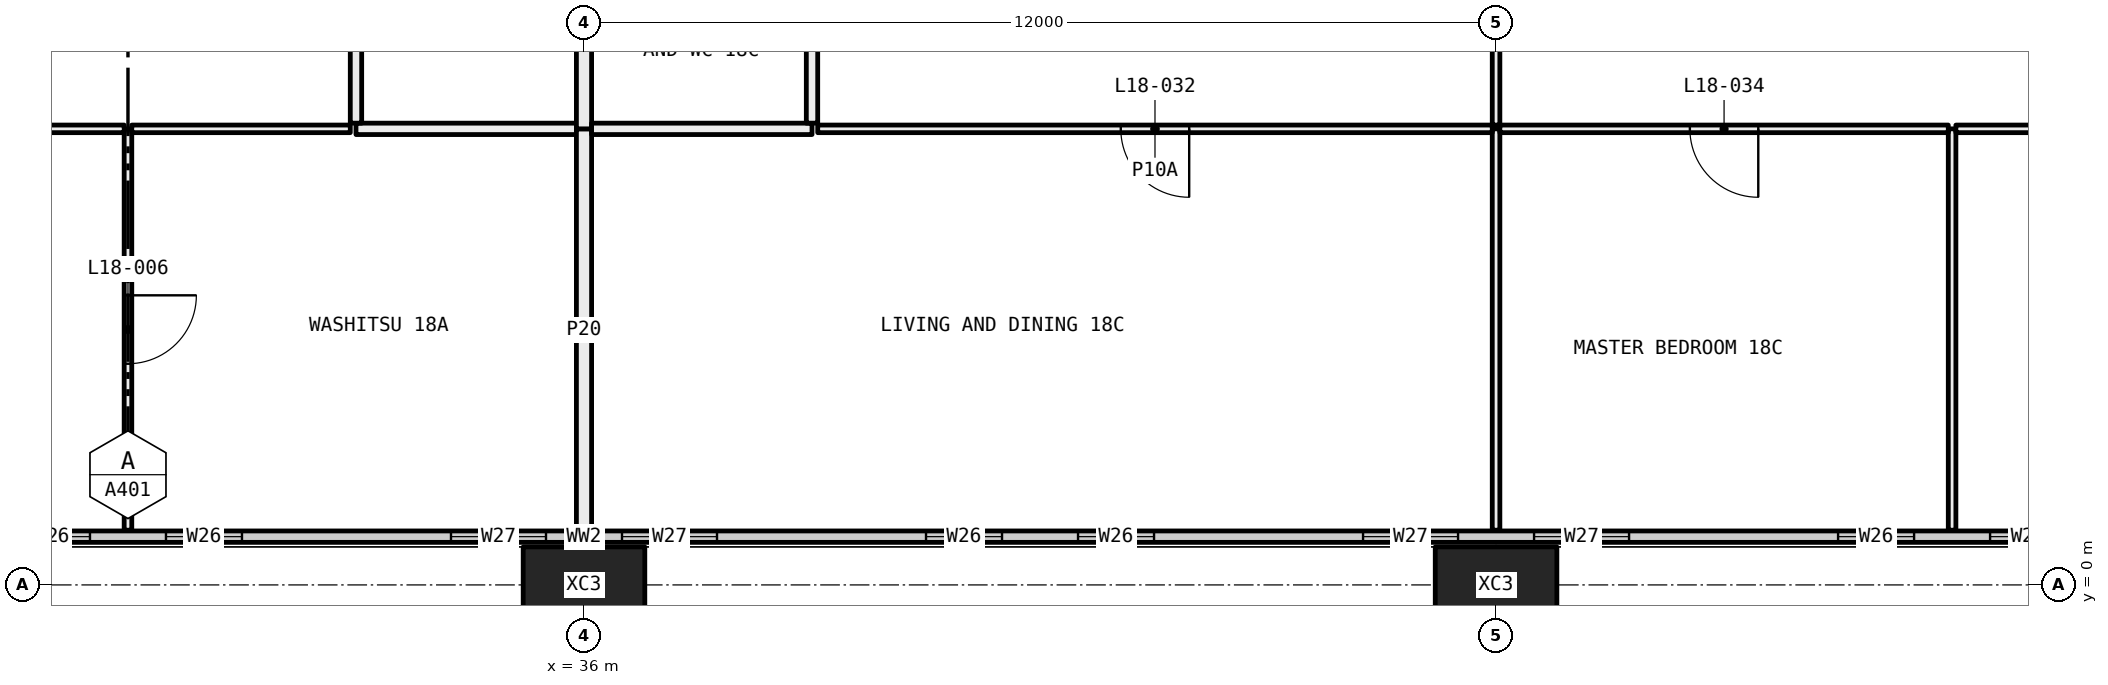
"""IFC4 building model, lengths in metres.
Left out: names, types, materials, properties, quantities, classifications, styles, units other than length and angle.
Written with IfcOpenShell. Run it as: python <this file> out.ifc"""

import sys

from ifc_helpers import new_model, si_unit, direction, frame, frame_2d, origin, origin_2d, place, context, subcontext, project, spatial, rectangle, hollow_rectangle, extrude, element, fill, save


model = new_model("IFC4")
c1 = context("Model", 3, precision=1e-05, world=origin(), true_north=direction((0.0, 1.0)))
c2 = subcontext(c1, "Body", "Model", "MODEL_VIEW")
j1 = project(units=[si_unit("LENGTHUNIT", "METRE"), si_unit("PLANEANGLEUNIT", "RADIAN")], contexts=[c1])
p1 = place(None, origin())
s1 = spatial("IfcSite", under=j1, at=p1, CompositionType="ELEMENT")
p2 = place(p1, origin())
s2 = spatial("IfcBuilding", under=s1, at=p2, CompositionType="ELEMENT")
p3 = place(p2, frame((0.0, 0.0, 74.85)))
s3 = spatial("IfcBuildingStorey", under=s2, at=p3, CompositionType="ELEMENT", Elevation=74.85)
for number, where, z_axis, x_axis in (
    (1, (36.0, 0.0, -0.4), (0.0, 0.0, 1.0), (1.0, 0.0, 0.0)),
    (2, (48.0, 0.0, -0.4), (0.0, 0.0, 1.0), (1.0, 0.0, 0.0)),
):
    element("IfcColumn", number, at=place(p3, frame(where, z_axis=z_axis, x_axis=x_axis)), inside=s3, PredefinedType="COLUMN", context=c2, shape_type="SweptSolid", body=[
        extrude(hollow_rectangle(XDim=1.6, YDim=1.0, WallThickness=0.065, at=origin_2d()), origin(), (0.0, 0.0, 1.0), 3.45),
    ])
p4 = place(p3, frame((6.56, 0.635, 0.0), z_axis=(0.0, 0.0, 1.0), x_axis=(1.0, 0.0, 0.0)))
e3 = element("IfcWall", 3, at=p4, inside=s3, PredefinedType="ELEMENTEDWALL", context=c2, shape_type="SweptSolid", body=[
    extrude(rectangle(XDim=58.88, YDim=0.15, at=frame_2d((29.44, 0.0))), origin(), (0.0, 0.0, 1.0), 3.05),
])
p5 = place(p4, frame((0.44, 0.0, 0.45)))
e4 = element("IfcOpeningElement", 4, at=p5, cuts=e3, PredefinedType="OPENING", context=c2, shape_type="SweptSolid", body=[
    extrude(rectangle(XDim=4.5, YDim=2.55, at=frame_2d((2.25, 1.275))), frame((0.0, 0.085, 0.0), z_axis=(0.0, -1.0, 0.0), x_axis=(1.0, 0.0, 0.0)), (0.0, 0.0, 1.0), 0.17),
])
p6 = place(p4, frame((5.94, 0.0, 0.45)))
e5 = element("IfcOpeningElement", 5, at=p6, cuts=e3, PredefinedType="OPENING", context=c2, shape_type="SweptSolid", body=[
    extrude(rectangle(XDim=1.25, YDim=2.55, at=frame_2d((0.625, 1.275))), frame((0.0, 0.085, 0.0), z_axis=(0.0, -1.0, 0.0), x_axis=(1.0, 0.0, 0.0)), (0.0, 0.0, 1.0), 0.17),
])
p7 = place(p4, frame((9.94, 0.0, 0.45)))
e6 = element("IfcOpeningElement", 6, at=p7, cuts=e3, PredefinedType="OPENING", context=c2, shape_type="SweptSolid", body=[
    extrude(rectangle(XDim=1.0, YDim=2.55, at=frame_2d((0.5, 1.275))), frame((0.0, 0.085, 0.0), z_axis=(0.0, -1.0, 0.0), x_axis=(1.0, 0.0, 0.0)), (0.0, 0.0, 1.0), 0.17),
])
p8 = place(p4, frame((11.94, 0.0, 0.45)))
e7 = element("IfcOpeningElement", 7, at=p8, cuts=e3, PredefinedType="OPENING", context=c2, shape_type="SweptSolid", body=[
    extrude(rectangle(XDim=1.0, YDim=2.55, at=frame_2d((0.5, 1.275))), frame((0.0, 0.085, 0.0), z_axis=(0.0, -1.0, 0.0), x_axis=(1.0, 0.0, 0.0)), (0.0, 0.0, 1.0), 0.17),
])
p9 = place(p4, frame((15.69, 0.0, 0.45)))
e8 = element("IfcOpeningElement", 8, at=p9, cuts=e3, PredefinedType="OPENING", context=c2, shape_type="SweptSolid", body=[
    extrude(rectangle(XDim=1.25, YDim=2.55, at=frame_2d((0.625, 1.275))), frame((0.0, 0.085, 0.0), z_axis=(0.0, -1.0, 0.0), x_axis=(1.0, 0.0, 0.0)), (0.0, 0.0, 1.0), 0.17),
])
p10 = place(p4, frame((17.94, 0.0, 0.45)))
e9 = element("IfcOpeningElement", 9, at=p10, cuts=e3, PredefinedType="OPENING", context=c2, shape_type="SweptSolid", body=[
    extrude(rectangle(XDim=1.25, YDim=2.55, at=frame_2d((0.625, 1.275))), frame((0.0, 0.085, 0.0), z_axis=(0.0, -1.0, 0.0), x_axis=(1.0, 0.0, 0.0)), (0.0, 0.0, 1.0), 0.17),
])
p11 = place(p4, frame((21.94, 0.0, 0.45)))
e10 = element("IfcOpeningElement", 10, at=p11, cuts=e3, PredefinedType="OPENING", context=c2, shape_type="SweptSolid", body=[
    extrude(rectangle(XDim=1.0, YDim=2.55, at=frame_2d((0.5, 1.275))), frame((0.0, 0.085, 0.0), z_axis=(0.0, -1.0, 0.0), x_axis=(1.0, 0.0, 0.0)), (0.0, 0.0, 1.0), 0.17),
])
p12 = place(p4, frame((23.94, 0.0, 0.45)))
e11 = element("IfcOpeningElement", 11, at=p12, cuts=e3, PredefinedType="OPENING", context=c2, shape_type="SweptSolid", body=[
    extrude(rectangle(XDim=1.0, YDim=2.55, at=frame_2d((0.5, 1.275))), frame((0.0, 0.085, 0.0), z_axis=(0.0, -1.0, 0.0), x_axis=(1.0, 0.0, 0.0)), (0.0, 0.0, 1.0), 0.17),
])
p13 = place(p4, frame((27.69, 0.0, 0.45)))
e12 = element("IfcOpeningElement", 12, at=p13, cuts=e3, PredefinedType="OPENING", context=c2, shape_type="SweptSolid", body=[
    extrude(rectangle(XDim=1.25, YDim=2.55, at=frame_2d((0.625, 1.275))), frame((0.0, 0.085, 0.0), z_axis=(0.0, -1.0, 0.0), x_axis=(1.0, 0.0, 0.0)), (0.0, 0.0, 1.0), 0.17),
])
p14 = place(p4, frame((29.94, 0.0, 0.45)))
e13 = element("IfcOpeningElement", 13, at=p14, cuts=e3, PredefinedType="OPENING", context=c2, shape_type="SweptSolid", body=[
    extrude(rectangle(XDim=1.25, YDim=2.55, at=frame_2d((0.625, 1.275))), frame((0.0, 0.085, 0.0), z_axis=(0.0, -1.0, 0.0), x_axis=(1.0, 0.0, 0.0)), (0.0, 0.0, 1.0), 0.17),
])
p15 = place(p4, frame((33.94, 0.0, 0.45)))
e14 = element("IfcOpeningElement", 14, at=p15, cuts=e3, PredefinedType="OPENING", context=c2, shape_type="SweptSolid", body=[
    extrude(rectangle(XDim=1.0, YDim=2.55, at=frame_2d((0.5, 1.275))), frame((0.0, 0.085, 0.0), z_axis=(0.0, -1.0, 0.0), x_axis=(1.0, 0.0, 0.0)), (0.0, 0.0, 1.0), 0.17),
])
p16 = place(p4, frame((35.94, 0.0, 0.45)))
e15 = element("IfcOpeningElement", 15, at=p16, cuts=e3, PredefinedType="OPENING", context=c2, shape_type="SweptSolid", body=[
    extrude(rectangle(XDim=1.0, YDim=2.55, at=frame_2d((0.5, 1.275))), frame((0.0, 0.085, 0.0), z_axis=(0.0, -1.0, 0.0), x_axis=(1.0, 0.0, 0.0)), (0.0, 0.0, 1.0), 0.17),
])
p17 = place(p4, frame((39.69, 0.0, 0.45)))
e16 = element("IfcOpeningElement", 16, at=p17, cuts=e3, PredefinedType="OPENING", context=c2, shape_type="SweptSolid", body=[
    extrude(rectangle(XDim=1.25, YDim=2.55, at=frame_2d((0.625, 1.275))), frame((0.0, 0.085, 0.0), z_axis=(0.0, -1.0, 0.0), x_axis=(1.0, 0.0, 0.0)), (0.0, 0.0, 1.0), 0.17),
])
p18 = place(p4, frame((41.94, 0.0, 0.45)))
e17 = element("IfcOpeningElement", 17, at=p18, cuts=e3, PredefinedType="OPENING", context=c2, shape_type="SweptSolid", body=[
    extrude(rectangle(XDim=1.25, YDim=2.55, at=frame_2d((0.625, 1.275))), frame((0.0, 0.085, 0.0), z_axis=(0.0, -1.0, 0.0), x_axis=(1.0, 0.0, 0.0)), (0.0, 0.0, 1.0), 0.17),
])
p19 = place(p4, frame((45.94, 0.0, 0.45)))
e18 = element("IfcOpeningElement", 18, at=p19, cuts=e3, PredefinedType="OPENING", context=c2, shape_type="SweptSolid", body=[
    extrude(rectangle(XDim=1.0, YDim=2.55, at=frame_2d((0.5, 1.275))), frame((0.0, 0.085, 0.0), z_axis=(0.0, -1.0, 0.0), x_axis=(1.0, 0.0, 0.0)), (0.0, 0.0, 1.0), 0.17),
])
p20 = place(p4, frame((47.94, 0.0, 0.45)))
e19 = element("IfcOpeningElement", 19, at=p20, cuts=e3, PredefinedType="OPENING", context=c2, shape_type="SweptSolid", body=[
    extrude(rectangle(XDim=1.0, YDim=2.55, at=frame_2d((0.5, 1.275))), frame((0.0, 0.085, 0.0), z_axis=(0.0, -1.0, 0.0), x_axis=(1.0, 0.0, 0.0)), (0.0, 0.0, 1.0), 0.17),
])
p21 = place(p4, frame((51.69, 0.0, 0.45)))
e20 = element("IfcOpeningElement", 20, at=p21, cuts=e3, PredefinedType="OPENING", context=c2, shape_type="SweptSolid", body=[
    extrude(rectangle(XDim=1.25, YDim=2.55, at=frame_2d((0.625, 1.275))), frame((0.0, 0.085, 0.0), z_axis=(0.0, -1.0, 0.0), x_axis=(1.0, 0.0, 0.0)), (0.0, 0.0, 1.0), 0.17),
])
p22 = place(p4, frame((53.94, 0.0, 0.45)))
e21 = element("IfcOpeningElement", 21, at=p22, cuts=e3, PredefinedType="OPENING", context=c2, shape_type="SweptSolid", body=[
    extrude(rectangle(XDim=4.5, YDim=2.55, at=frame_2d((2.25, 1.275))), frame((0.0, 0.085, 0.0), z_axis=(0.0, -1.0, 0.0), x_axis=(1.0, 0.0, 0.0)), (0.0, 0.0, 1.0), 0.17),
])
p23 = place(p3, frame((30.0, 0.72, 0.0), z_axis=(0.0, 0.0, 1.0), x_axis=(0.0, 1.0, 0.0)))
e22 = element("IfcWall", 22, at=p23, inside=s3, PredefinedType="PARTITIONING", context=c2, shape_type="SweptSolid", body=[
    extrude(rectangle(XDim=5.28, YDim=0.1, at=frame_2d((2.64, 0.0))), origin(), (0.0, 0.0, 1.0), 3.05),
])
p24 = place(p23, frame((2.19, 0.0, 0.0)))
e23 = element("IfcOpeningElement", 23, at=p24, cuts=e22, PredefinedType="OPENING", context=c2, shape_type="SweptSolid", body=[
    extrude(rectangle(XDim=0.9, YDim=2.1, at=frame_2d((0.45, 1.05))), frame((0.0, 0.06, 0.0), z_axis=(0.0, -1.0, 0.0), x_axis=(1.0, 0.0, 0.0)), (0.0, 0.0, 1.0), 0.12),
])
p25 = place(p3, frame((29.95, 6.0, 0.0), z_axis=(0.0, 0.0, 1.0), x_axis=(-1.0, 0.0, 0.0)))
e24 = element("IfcWall", 24, at=p25, inside=s3, PredefinedType="PARTITIONING", context=c2, shape_type="SweptSolid", body=[
    extrude(rectangle(XDim=6.05, YDim=0.1, at=frame_2d((3.025, 0.0))), origin(), (0.0, 0.0, 1.0), 2.45),
])
p26 = place(p25, frame((2.575, 0.0, 0.0)))
e25 = element("IfcOpeningElement", 25, at=p26, cuts=e24, PredefinedType="OPENING", context=c2, shape_type="SweptSolid", body=[
    extrude(rectangle(XDim=0.9, YDim=2.1, at=frame_2d((0.45, 1.05))), frame((0.0, 0.06, 0.0), z_axis=(0.0, -1.0, 0.0), x_axis=(1.0, 0.0, 0.0)), (0.0, 0.0, 1.0), 0.12),
])
p27 = place(p3, frame((32.925, 6.0, 0.0), z_axis=(0.0, 0.0, 1.0), x_axis=(-1.0, 0.0, 0.0)))
e26 = element("IfcWall", 26, at=p27, inside=s3, PredefinedType="PARTITIONING", context=c2, shape_type="SweptSolid", body=[
    extrude(rectangle(XDim=2.875, YDim=0.1, at=frame_2d((1.438, 0.0))), origin(), (0.0, 0.0, 1.0), 3.05),
])
p28 = place(p3, frame((35.9, 6.0, 0.0), z_axis=(0.0, 0.0, 1.0), x_axis=(-1.0, 0.0, 0.0)))
e27 = element("IfcWall", 27, at=p28, inside=s3, PredefinedType="PARTITIONING", context=c2, shape_type="SweptSolid", body=[
    extrude(rectangle(XDim=2.9, YDim=0.15, at=frame_2d((1.45, 0.0))), origin(), (0.0, 0.0, 1.0), 3.05),
])
p29 = place(p3, frame((36.0, 0.72, 0.0), z_axis=(0.0, 0.0, 1.0), x_axis=(0.0, 1.0, 0.0)))
e28 = element("IfcWall", 28, at=p29, inside=s3, PredefinedType="PARTITIONING", context=c2, shape_type="SweptSolid", body=[
    extrude(rectangle(XDim=5.28, YDim=0.2, at=frame_2d((2.64, 0.0))), origin(), (0.0, 0.0, 1.0), 2.45),
])
p30 = place(p3, frame((33.0, 6.075, 0.0), z_axis=(0.0, 0.0, 1.0), x_axis=(0.0, 1.0, 0.0)))
e29 = element("IfcWall", 29, at=p30, inside=s3, PredefinedType="PARTITIONING", context=c2, shape_type="SweptSolid", body=[
    extrude(rectangle(XDim=5.925, YDim=0.15, at=frame_2d((2.962, 0.0))), origin(), (0.0, 0.0, 1.0), 2.45),
])
p31 = place(p30, frame((2.512, 0.0, 0.0)))
e30 = element("IfcOpeningElement", 30, at=p31, cuts=e29, PredefinedType="OPENING", context=c2, shape_type="SweptSolid", body=[
    extrude(rectangle(XDim=0.9, YDim=2.1, at=frame_2d((0.45, 1.05))), frame((0.0, 0.085, 0.0), z_axis=(0.0, -1.0, 0.0), x_axis=(1.0, 0.0, 0.0)), (0.0, 0.0, 1.0), 0.17),
])
p32 = place(p3, frame((36.0, 6.0, 0.0), z_axis=(0.0, 0.0, 1.0), x_axis=(0.0, 1.0, 0.0)))
e31 = element("IfcWall", 31, at=p32, inside=s3, PredefinedType="PARTITIONING", context=c2, shape_type="SweptSolid", body=[
    extrude(rectangle(XDim=5.2, YDim=0.2, at=frame_2d((2.6, 0.0))), origin(), (0.0, 0.0, 1.0), 2.45),
])
p33 = place(p3, frame((48.0, 0.72, 0.0), z_axis=(0.0, 0.0, 1.0), x_axis=(0.0, 1.0, 0.0)))
e32 = element("IfcWall", 32, at=p33, inside=s3, PredefinedType="PARTITIONING", context=c2, shape_type="SweptSolid", body=[
    extrude(rectangle(XDim=5.28, YDim=0.1, at=frame_2d((2.64, 0.0))), origin(), (0.0, 0.0, 1.0), 2.45),
])
p34 = place(p3, frame((39.0, 6.0, 0.0), z_axis=(0.0, 0.0, 1.0), x_axis=(-1.0, 0.0, 0.0)))
e33 = element("IfcWall", 33, at=p34, inside=s3, PredefinedType="PARTITIONING", context=c2, shape_type="SweptSolid", body=[
    extrude(rectangle(XDim=2.9, YDim=0.15, at=frame_2d((1.45, 0.0))), origin(), (0.0, 0.0, 1.0), 3.05),
])
p35 = place(p3, frame((47.95, 6.0, 0.0), z_axis=(0.0, 0.0, 1.0), x_axis=(-1.0, 0.0, 0.0)))
e34 = element("IfcWall", 34, at=p35, inside=s3, PredefinedType="PARTITIONING", context=c2, shape_type="SweptSolid", body=[
    extrude(rectangle(XDim=8.875, YDim=0.1, at=frame_2d((4.438, 0.0))), origin(), (0.0, 0.0, 1.0), 2.45),
])
p36 = place(p35, frame((3.988, 0.0, 0.0)))
e35 = element("IfcOpeningElement", 35, at=p36, cuts=e34, PredefinedType="OPENING", context=c2, shape_type="SweptSolid", body=[
    extrude(rectangle(XDim=0.9, YDim=2.1, at=frame_2d((0.45, 1.05))), frame((0.0, 0.06, 0.0), z_axis=(0.0, -1.0, 0.0), x_axis=(1.0, 0.0, 0.0)), (0.0, 0.0, 1.0), 0.12),
])
p37 = place(p3, frame((54.0, 0.72, 0.0), z_axis=(0.0, 0.0, 1.0), x_axis=(0.0, 1.0, 0.0)))
e36 = element("IfcWall", 36, at=p37, inside=s3, PredefinedType="PARTITIONING", context=c2, shape_type="SweptSolid", body=[
    extrude(rectangle(XDim=5.28, YDim=0.1, at=frame_2d((2.64, 0.0))), origin(), (0.0, 0.0, 1.0), 3.05),
])
p38 = place(p3, frame((53.95, 6.0, 0.0), z_axis=(0.0, 0.0, 1.0), x_axis=(-1.0, 0.0, 0.0)))
e37 = element("IfcWall", 37, at=p38, inside=s3, PredefinedType="PARTITIONING", context=c2, shape_type="SweptSolid", body=[
    extrude(rectangle(XDim=5.9, YDim=0.1, at=frame_2d((2.95, 0.0))), origin(), (0.0, 0.0, 1.0), 2.45),
])
p39 = place(p38, frame((2.5, 0.0, 0.0)))
e38 = element("IfcOpeningElement", 38, at=p39, cuts=e37, PredefinedType="OPENING", context=c2, shape_type="SweptSolid", body=[
    extrude(rectangle(XDim=0.9, YDim=2.1, at=frame_2d((0.45, 1.05))), frame((0.0, 0.06, 0.0), z_axis=(0.0, -1.0, 0.0), x_axis=(1.0, 0.0, 0.0)), (0.0, 0.0, 1.0), 0.12),
])
p40 = place(p3, frame((57.0, 6.0, 0.0), z_axis=(0.0, 0.0, 1.0), x_axis=(-1.0, 0.0, 0.0)))
e39 = element("IfcWall", 39, at=p40, inside=s3, PredefinedType="PARTITIONING", context=c2, shape_type="SweptSolid", body=[
    extrude(rectangle(XDim=2.95, YDim=0.1, at=frame_2d((1.475, 0.0))), origin(), (0.0, 0.0, 1.0), 3.05),
])
p41 = place(p40, frame((1.025, 0.0, 0.0)))
e40 = element("IfcOpeningElement", 40, at=p41, cuts=e39, PredefinedType="OPENING", context=c2, shape_type="SweptSolid", body=[
    extrude(rectangle(XDim=0.9, YDim=2.1, at=frame_2d((0.45, 1.05))), frame((0.0, 0.06, 0.0), z_axis=(0.0, -1.0, 0.0), x_axis=(1.0, 0.0, 0.0)), (0.0, 0.0, 1.0), 0.12),
])
p42 = place(p3, frame((39.0, 6.075, 0.0), z_axis=(0.0, 0.0, 1.0), x_axis=(0.0, 1.0, 0.0)))
e41 = element("IfcWall", 41, at=p42, inside=s3, PredefinedType="PARTITIONING", context=c2, shape_type="SweptSolid", body=[
    extrude(rectangle(XDim=5.925, YDim=0.15, at=frame_2d((2.962, 0.0))), origin(), (0.0, 0.0, 1.0), 2.45),
])
p43 = place(p42, frame((2.512, 0.0, 0.0)))
e42 = element("IfcOpeningElement", 42, at=p43, cuts=e41, PredefinedType="OPENING", context=c2, shape_type="SweptSolid", body=[
    extrude(rectangle(XDim=0.9, YDim=2.1, at=frame_2d((0.45, 1.05))), frame((0.0, 0.085, 0.0), z_axis=(0.0, -1.0, 0.0), x_axis=(1.0, 0.0, 0.0)), (0.0, 0.0, 1.0), 0.17),
])
p44 = place(p3, frame((48.0, 6.05, 0.0), z_axis=(0.0, 0.0, 1.0), x_axis=(0.0, 1.0, 0.0)))
e43 = element("IfcWall", 43, at=p44, inside=s3, PredefinedType="PARTITIONING", context=c2, shape_type="SweptSolid", body=[
    extrude(rectangle(XDim=5.15, YDim=0.1, at=frame_2d((2.575, 0.0))), origin(), (0.0, 0.0, 1.0), 2.45),
])
p45 = place(p44, frame((2.125, 0.0, 0.0)))
e44 = element("IfcOpeningElement", 44, at=p45, cuts=e43, PredefinedType="OPENING", context=c2, shape_type="SweptSolid", body=[
    extrude(rectangle(XDim=0.9, YDim=2.1, at=frame_2d((0.45, 1.05))), frame((0.0, 0.06, 0.0), z_axis=(0.0, -1.0, 0.0), x_axis=(1.0, 0.0, 0.0)), (0.0, 0.0, 1.0), 0.12),
])
p46 = place(p11, origin())
e45 = element("IfcWindow", 45, at=p46, inside=s3, PartitioningType="SINGLE_PANEL", PredefinedType="WINDOW", context=c2, shape_type="SweptSolid", body=[
    extrude(rectangle(XDim=1.0, YDim=2.55, at=frame_2d((0.5, 1.275))), frame((0.0, 0.03, 0.0), z_axis=(0.0, -1.0, 0.0), x_axis=(1.0, 0.0, 0.0)), (0.0, 0.0, 1.0), 0.06),
])
fill(e10, e45)
p47 = place(p12, origin())
e46 = element("IfcWindow", 46, at=p47, inside=s3, PartitioningType="SINGLE_PANEL", PredefinedType="WINDOW", context=c2, shape_type="SweptSolid", body=[
    extrude(rectangle(XDim=1.0, YDim=2.55, at=frame_2d((0.5, 1.275))), frame((0.0, 0.03, 0.0), z_axis=(0.0, -1.0, 0.0), x_axis=(1.0, 0.0, 0.0)), (0.0, 0.0, 1.0), 0.06),
])
fill(e11, e46)
p48 = place(p13, origin())
e47 = element("IfcWindow", 47, at=p48, inside=s3, PartitioningType="SINGLE_PANEL", PredefinedType="WINDOW", context=c2, shape_type="SweptSolid", body=[
    extrude(rectangle(XDim=1.25, YDim=2.55, at=frame_2d((0.625, 1.275))), frame((0.0, 0.03, 0.0), z_axis=(0.0, -1.0, 0.0), x_axis=(1.0, 0.0, 0.0)), (0.0, 0.0, 1.0), 0.06),
])
fill(e12, e47)
p49 = place(p14, origin())
e48 = element("IfcWindow", 48, at=p49, inside=s3, PartitioningType="SINGLE_PANEL", PredefinedType="WINDOW", context=c2, shape_type="SweptSolid", body=[
    extrude(rectangle(XDim=1.25, YDim=2.55, at=frame_2d((0.625, 1.275))), frame((0.0, 0.03, 0.0), z_axis=(0.0, -1.0, 0.0), x_axis=(1.0, 0.0, 0.0)), (0.0, 0.0, 1.0), 0.06),
])
fill(e13, e48)
p50 = place(p15, origin())
e49 = element("IfcWindow", 49, at=p50, inside=s3, PartitioningType="SINGLE_PANEL", PredefinedType="WINDOW", context=c2, shape_type="SweptSolid", body=[
    extrude(rectangle(XDim=1.0, YDim=2.55, at=frame_2d((0.5, 1.275))), frame((0.0, 0.03, 0.0), z_axis=(0.0, -1.0, 0.0), x_axis=(1.0, 0.0, 0.0)), (0.0, 0.0, 1.0), 0.06),
])
fill(e14, e49)
p51 = place(p16, origin())
e50 = element("IfcWindow", 50, at=p51, inside=s3, PartitioningType="SINGLE_PANEL", PredefinedType="WINDOW", context=c2, shape_type="SweptSolid", body=[
    extrude(rectangle(XDim=1.0, YDim=2.55, at=frame_2d((0.5, 1.275))), frame((0.0, 0.03, 0.0), z_axis=(0.0, -1.0, 0.0), x_axis=(1.0, 0.0, 0.0)), (0.0, 0.0, 1.0), 0.06),
])
fill(e15, e50)
p52 = place(p17, origin())
e51 = element("IfcWindow", 51, at=p52, inside=s3, PartitioningType="SINGLE_PANEL", PredefinedType="WINDOW", context=c2, shape_type="SweptSolid", body=[
    extrude(rectangle(XDim=1.25, YDim=2.55, at=frame_2d((0.625, 1.275))), frame((0.0, 0.03, 0.0), z_axis=(0.0, -1.0, 0.0), x_axis=(1.0, 0.0, 0.0)), (0.0, 0.0, 1.0), 0.06),
])
fill(e16, e51)
p53 = place(p18, origin())
e52 = element("IfcWindow", 52, at=p53, inside=s3, PartitioningType="SINGLE_PANEL", PredefinedType="WINDOW", context=c2, shape_type="SweptSolid", body=[
    extrude(rectangle(XDim=1.25, YDim=2.55, at=frame_2d((0.625, 1.275))), frame((0.0, 0.03, 0.0), z_axis=(0.0, -1.0, 0.0), x_axis=(1.0, 0.0, 0.0)), (0.0, 0.0, 1.0), 0.06),
])
fill(e17, e52)
p54 = place(p19, origin())
e53 = element("IfcWindow", 53, at=p54, inside=s3, PartitioningType="SINGLE_PANEL", PredefinedType="WINDOW", context=c2, shape_type="SweptSolid", body=[
    extrude(rectangle(XDim=1.0, YDim=2.55, at=frame_2d((0.5, 1.275))), frame((0.0, 0.03, 0.0), z_axis=(0.0, -1.0, 0.0), x_axis=(1.0, 0.0, 0.0)), (0.0, 0.0, 1.0), 0.06),
])
fill(e18, e53)
p55 = place(p20, origin())
e54 = element("IfcWindow", 54, at=p55, inside=s3, PartitioningType="SINGLE_PANEL", PredefinedType="WINDOW", context=c2, shape_type="SweptSolid", body=[
    extrude(rectangle(XDim=1.0, YDim=2.55, at=frame_2d((0.5, 1.275))), frame((0.0, 0.03, 0.0), z_axis=(0.0, -1.0, 0.0), x_axis=(1.0, 0.0, 0.0)), (0.0, 0.0, 1.0), 0.06),
])
fill(e19, e54)
p56 = place(p24, frame((0.9, 0.0, 0.0), x_axis=(-1.0, 0.0, 0.0)))
e55 = element("IfcDoor", 55, at=p56, inside=s3, OperationType="SINGLE_SWING_RIGHT", PredefinedType="DOOR", context=c2, shape_type="SweptSolid", body=[
    extrude(rectangle(XDim=0.9, YDim=2.1, at=frame_2d((0.45, 1.05))), frame((0.0, 0.025, 0.0), z_axis=(0.0, -1.0, 0.0), x_axis=(1.0, 0.0, 0.0)), (0.0, 0.0, 1.0), 0.05),
])
fill(e23, e55)
p57 = place(p36, origin())
e56 = element("IfcDoor", 56, at=p57, inside=s3, OperationType="SINGLE_SWING_RIGHT", PredefinedType="DOOR", context=c2, shape_type="SweptSolid", body=[
    extrude(rectangle(XDim=0.9, YDim=2.1, at=frame_2d((0.45, 1.05))), frame((0.0, 0.025, 0.0), z_axis=(0.0, -1.0, 0.0), x_axis=(1.0, 0.0, 0.0)), (0.0, 0.0, 1.0), 0.05),
])
fill(e35, e56)
p58 = place(p39, origin())
e57 = element("IfcDoor", 57, at=p58, inside=s3, OperationType="SINGLE_SWING_RIGHT", PredefinedType="DOOR", context=c2, shape_type="SweptSolid", body=[
    extrude(rectangle(XDim=0.9, YDim=2.1, at=frame_2d((0.45, 1.05))), frame((0.0, 0.025, 0.0), z_axis=(0.0, -1.0, 0.0), x_axis=(1.0, 0.0, 0.0)), (0.0, 0.0, 1.0), 0.05),
])
fill(e38, e57)
save(model, sys.argv[1])
